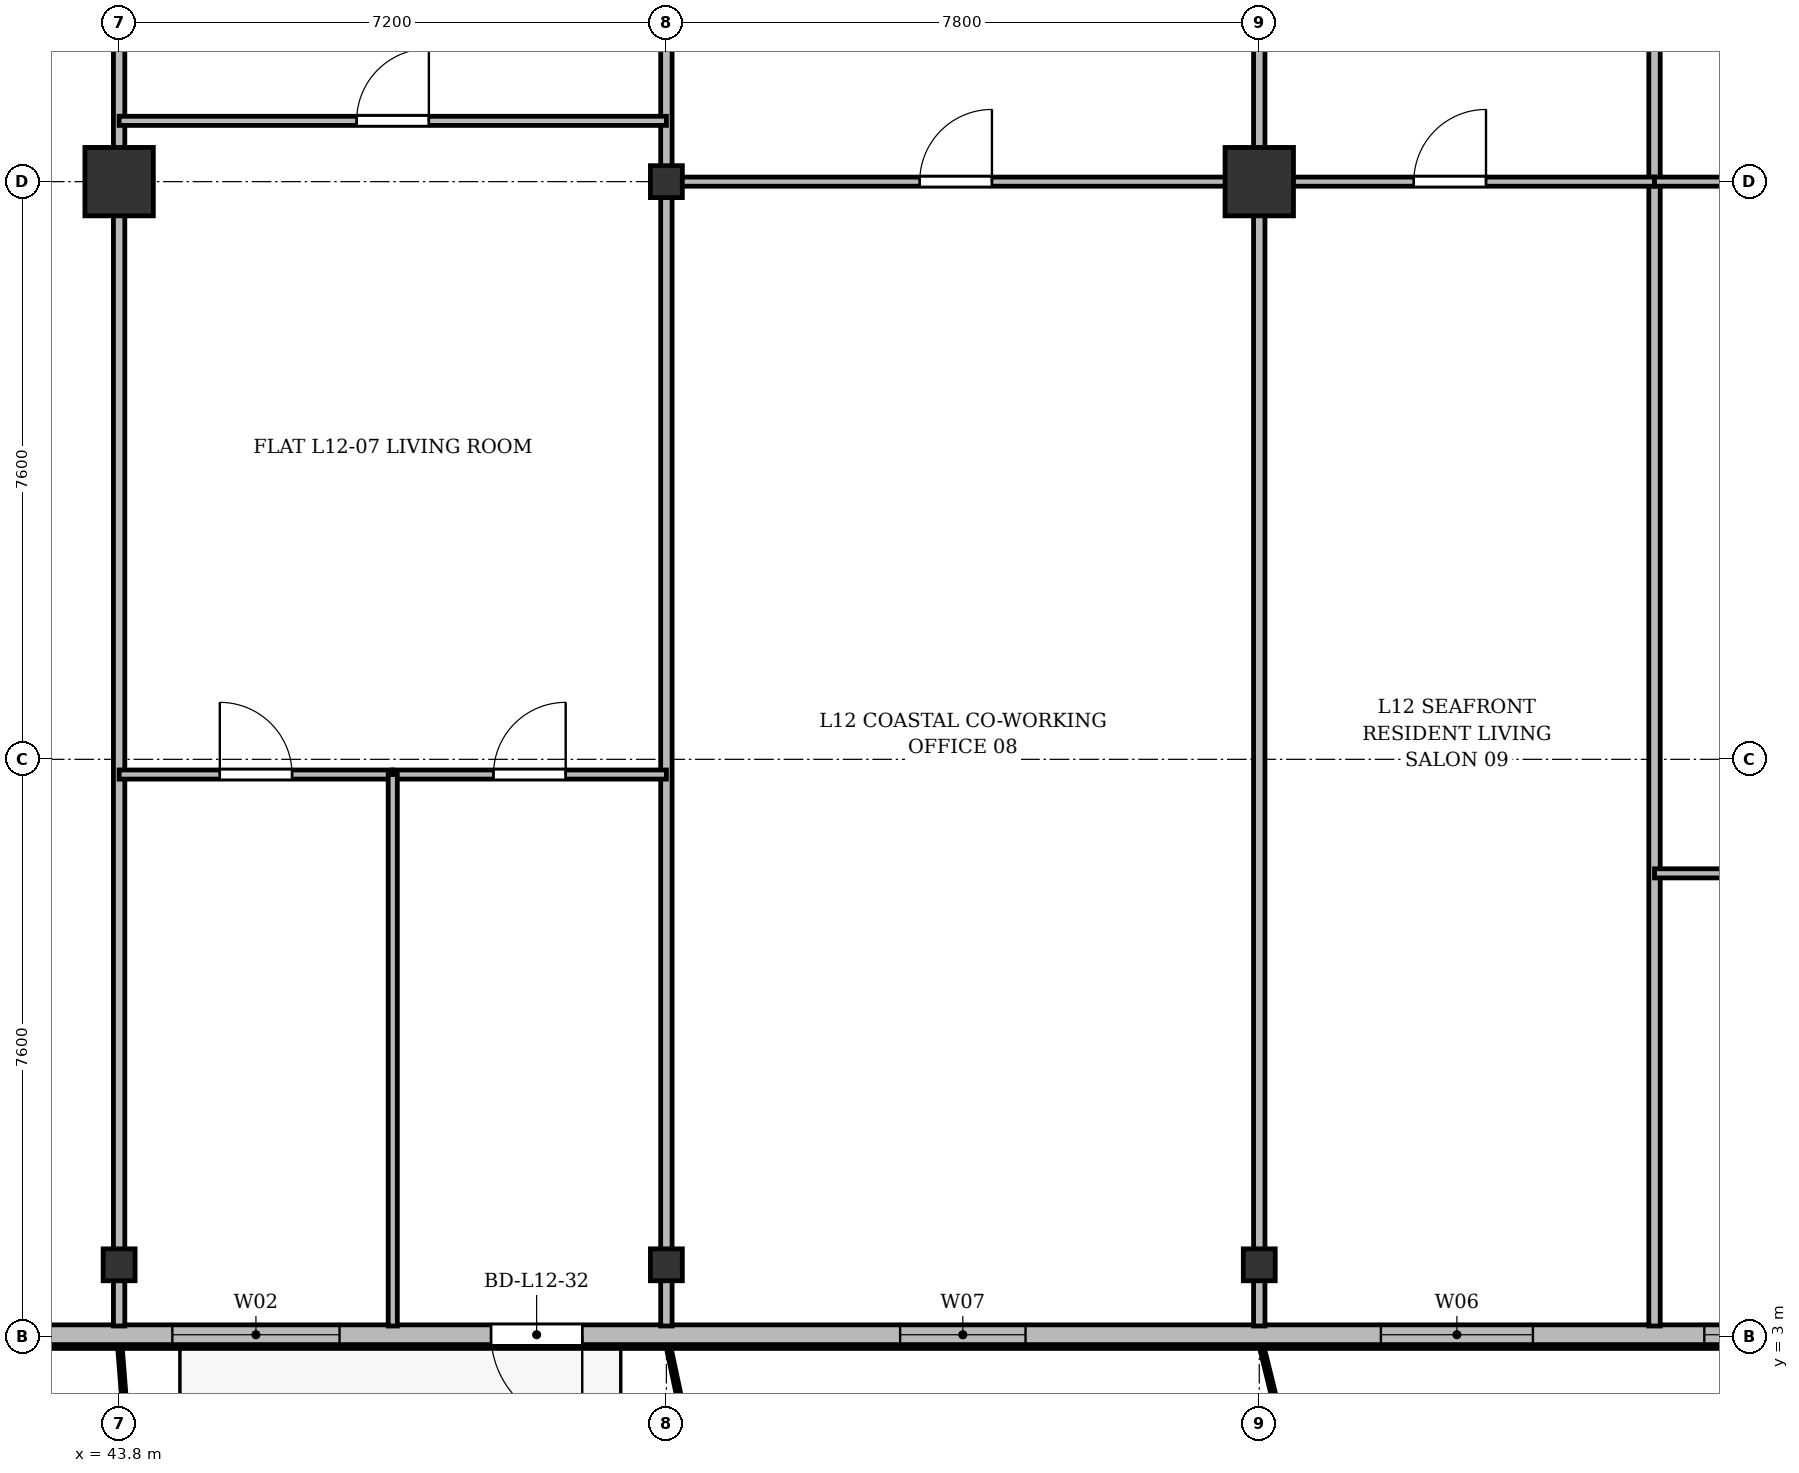
"""IFC4 building model, lengths in metres.
Left out: names, types, materials, properties, quantities, classifications, styles, units other than length and angle.
Written with IfcOpenShell. Run it as: python <this file> out.ifc"""

import sys

from ifc_helpers import new_model, si_unit, direction, frame, frame_2d, origin, origin_2d, place, context, subcontext, project, spatial, rectangle, i_section, extrude, source, transform, mapped, element, fill, save


model = new_model("IFC4")
c1 = context("Model", 3, precision=1e-05, world=origin(), true_north=direction((0.0, 1.0)))
c2 = subcontext(c1, "Body", "Model", "MODEL_VIEW")
j1 = project(units=[si_unit("LENGTHUNIT", "METRE"), si_unit("PLANEANGLEUNIT", "RADIAN")], contexts=[c1])
p1 = place(None, origin())
s1 = spatial("IfcSite", under=j1, at=p1, CompositionType="ELEMENT")
p2 = place(p1, origin())
s2 = spatial("IfcBuilding", under=s1, at=p2, CompositionType="ELEMENT")
p3 = place(p2, frame((0.0, 0.0, 48.7)))
s3 = spatial("IfcBuildingStorey", under=s2, at=p3, CompositionType="ELEMENT", Elevation=48.7)
m1 = source(origin(), c2, "Body", "SweptSolid", [
    extrude(i_section(OverallWidth=0.42, OverallDepth=0.42, WebThickness=0.026, FlangeThickness=0.04, at=origin_2d()), origin(), (0.0, 0.0, 1.0), 3.6),
])
p4 = place(p3, frame((43.8, 3.95, 0.0), z_axis=(0.0, 0.0, 1.0), x_axis=(1.0, 0.0, 0.0)))
e1 = element("IfcColumn", 1, at=p4, inside=s3, PredefinedType="COLUMN", context=c2, shape_type="MappedRepresentation", body=[
    mapped(m1, transform((0.0, 0.0, 0.0), x_axis=(1.0, 0.0, 0.0), y_axis=(0.0, 1.0, 0.0), z_axis=(0.0, 0.0, 1.0), scale=1.0)),
])
m2 = source(origin(), c2, "Body", "SweptSolid", [
    extrude(rectangle(XDim=0.9, YDim=0.9, at=origin_2d()), origin(), (0.0, 0.0, 1.0), 3.6),
])
p5 = place(p3, frame((43.8, 18.2, 0.0), z_axis=(0.0, 0.0, 1.0), x_axis=(1.0, 0.0, 0.0)))
e2 = element("IfcColumn", 2, at=p5, inside=s3, PredefinedType="COLUMN", context=c2, shape_type="MappedRepresentation", body=[
    mapped(m2, transform((0.0, 0.0, 0.0), x_axis=(1.0, 0.0, 0.0), y_axis=(0.0, 1.0, 0.0), z_axis=(0.0, 0.0, 1.0), scale=1.0)),
])
for number, where, z_axis, x_axis in (
    (3, (51.0, 3.95, 0.0), (0.0, 0.0, 1.0), (1.0, 0.0, 0.0)),
    (4, (51.0, 18.2, 0.0), (0.0, 0.0, 1.0), (1.0, 0.0, 0.0)),
    (5, (58.8, 3.95, 0.0), (0.0, 0.0, 1.0), (1.0, 0.0, 0.0)),
):
    element("IfcColumn", number, at=place(p3, frame(where, z_axis=z_axis, x_axis=x_axis)), inside=s3, PredefinedType="COLUMN", context=c2, shape_type="MappedRepresentation", body=[
        mapped(m1, transform((0.0, 0.0, 0.0), x_axis=(1.0, 0.0, 0.0), y_axis=(0.0, 1.0, 0.0), z_axis=(0.0, 0.0, 1.0), scale=1.0)),
    ])
p6 = place(p3, frame((58.8, 18.2, 0.0), z_axis=(0.0, 0.0, 1.0), x_axis=(1.0, 0.0, 0.0)))
e6 = element("IfcColumn", 6, at=p6, inside=s3, PredefinedType="COLUMN", context=c2, shape_type="MappedRepresentation", body=[
    mapped(m2, transform((0.0, 0.0, 0.0), x_axis=(1.0, 0.0, 0.0), y_axis=(0.0, 1.0, 0.0), z_axis=(0.0, 0.0, 1.0), scale=1.0)),
])
p7 = place(p3, frame((66.9, 3.03, 0.0), z_axis=(0.0, 0.0, 1.0), x_axis=(-1.0, 0.0, 0.0)))
e7 = element("IfcWall", 7, at=p7, inside=s3, PredefinedType="SOLIDWALL", context=c2, shape_type="SweptSolid", body=[
    extrude(rectangle(XDim=59.4, YDim=0.26, at=frame_2d((29.7, 0.0))), origin(), (0.0, 0.0, 1.0), 3.34),
])
p8 = place(p7, frame((0.745, 0.0, 0.9)))
e8 = element("IfcOpeningElement", 8, at=p8, cuts=e7, PredefinedType="OPENING", context=c2, shape_type="SweptSolid", body=[
    extrude(rectangle(XDim=1.5, YDim=1.75, at=frame_2d((0.75, 0.875))), frame((0.0, 0.14, 0.0), z_axis=(0.0, -1.0, 0.0), x_axis=(1.0, 0.0, 0.0)), (0.0, 0.0, 1.0), 0.28),
])
p9 = place(p7, frame((4.5, 0.0, 0.9)))
e9 = element("IfcOpeningElement", 9, at=p9, cuts=e7, PredefinedType="OPENING", context=c2, shape_type="SweptSolid", body=[
    extrude(rectangle(XDim=2.0, YDim=1.95, at=frame_2d((1.0, 0.975))), frame((0.0, 0.14, 0.0), z_axis=(0.0, -1.0, 0.0), x_axis=(1.0, 0.0, 0.0)), (0.0, 0.0, 1.0), 0.28),
])
p10 = place(p7, frame((11.175, 0.0, 0.9)))
e10 = element("IfcOpeningElement", 10, at=p10, cuts=e7, PredefinedType="OPENING", context=c2, shape_type="SweptSolid", body=[
    extrude(rectangle(XDim=1.65, YDim=1.85, at=frame_2d((0.825, 0.925))), frame((0.0, 0.14, 0.0), z_axis=(0.0, -1.0, 0.0), x_axis=(1.0, 0.0, 0.0)), (0.0, 0.0, 1.0), 0.28),
])
p11 = place(p7, frame((17.007, 0.0, 0.0)))
e11 = element("IfcOpeningElement", 11, at=p11, cuts=e7, PredefinedType="OPENING", context=c2, shape_type="SweptSolid", body=[
    extrude(rectangle(XDim=1.2, YDim=2.2, at=frame_2d((0.6, 1.1))), frame((0.0, 0.14, 0.0), z_axis=(0.0, -1.0, 0.0), x_axis=(1.0, 0.0, 0.0)), (0.0, 0.0, 1.0), 0.28),
])
p12 = place(p7, frame((20.2, 0.0, 0.9)))
e12 = element("IfcOpeningElement", 12, at=p12, cuts=e7, PredefinedType="OPENING", context=c2, shape_type="SweptSolid", body=[
    extrude(rectangle(XDim=2.2, YDim=1.8, at=frame_2d((1.1, 0.9))), frame((0.0, 0.14, 0.0), z_axis=(0.0, -1.0, 0.0), x_axis=(1.0, 0.0, 0.0)), (0.0, 0.0, 1.0), 0.28),
])
p13 = place(p7, frame((24.75, 0.0, 0.9)))
e13 = element("IfcOpeningElement", 13, at=p13, cuts=e7, PredefinedType="OPENING", context=c2, shape_type="SweptSolid", body=[
    extrude(rectangle(XDim=1.5, YDim=1.75, at=frame_2d((0.75, 0.875))), frame((0.0, 0.14, 0.0), z_axis=(0.0, -1.0, 0.0), x_axis=(1.0, 0.0, 0.0)), (0.0, 0.0, 1.0), 0.28),
])
p14 = place(p7, frame((31.1, 0.0, 0.9)))
e14 = element("IfcOpeningElement", 14, at=p14, cuts=e7, PredefinedType="OPENING", context=c2, shape_type="SweptSolid", body=[
    extrude(rectangle(XDim=2.0, YDim=1.95, at=frame_2d((1.0, 0.975))), frame((0.0, 0.14, 0.0), z_axis=(0.0, -1.0, 0.0), x_axis=(1.0, 0.0, 0.0)), (0.0, 0.0, 1.0), 0.28),
])
p15 = place(p7, frame((39.075, 0.0, 0.9)))
e15 = element("IfcOpeningElement", 15, at=p15, cuts=e7, PredefinedType="OPENING", context=c2, shape_type="SweptSolid", body=[
    extrude(rectangle(XDim=1.65, YDim=1.85, at=frame_2d((0.825, 0.925))), frame((0.0, 0.14, 0.0), z_axis=(0.0, -1.0, 0.0), x_axis=(1.0, 0.0, 0.0)), (0.0, 0.0, 1.0), 0.28),
])
p16 = place(p7, frame((45.435, 0.0, 0.0)))
e16 = element("IfcOpeningElement", 16, at=p16, cuts=e7, PredefinedType="OPENING", context=c2, shape_type="SweptSolid", body=[
    extrude(rectangle(XDim=1.2, YDim=2.2, at=frame_2d((0.6, 1.1))), frame((0.0, 0.14, 0.0), z_axis=(0.0, -1.0, 0.0), x_axis=(1.0, 0.0, 0.0)), (0.0, 0.0, 1.0), 0.28),
])
p17 = place(p7, frame((48.25, 0.0, 0.9)))
e17 = element("IfcOpeningElement", 17, at=p17, cuts=e7, PredefinedType="OPENING", context=c2, shape_type="SweptSolid", body=[
    extrude(rectangle(XDim=2.2, YDim=1.8, at=frame_2d((1.1, 0.9))), frame((0.0, 0.14, 0.0), z_axis=(0.0, -1.0, 0.0), x_axis=(1.0, 0.0, 0.0)), (0.0, 0.0, 1.0), 0.28),
])
p18 = place(p7, frame((52.35, 0.0, 0.9)))
e18 = element("IfcOpeningElement", 18, at=p18, cuts=e7, PredefinedType="OPENING", context=c2, shape_type="SweptSolid", body=[
    extrude(rectangle(XDim=1.5, YDim=1.75, at=frame_2d((0.75, 0.875))), frame((0.0, 0.14, 0.0), z_axis=(0.0, -1.0, 0.0), x_axis=(1.0, 0.0, 0.0)), (0.0, 0.0, 1.0), 0.28),
])
p19 = place(p7, frame((56.105, 0.0, 0.9)))
e19 = element("IfcOpeningElement", 19, at=p19, cuts=e7, PredefinedType="OPENING", context=c2, shape_type="SweptSolid", body=[
    extrude(rectangle(XDim=2.0, YDim=1.95, at=frame_2d((1.0, 0.975))), frame((0.0, 0.14, 0.0), z_axis=(0.0, -1.0, 0.0), x_axis=(1.0, 0.0, 0.0)), (0.0, 0.0, 1.0), 0.28),
])
for number, where, z_axis, x_axis in (
    (20, (43.8, 3.145, 0.0), (0.0, 0.0, 1.0), (0.0, 1.0, 0.0)),
    (21, (51.0, 3.145, 0.0), (0.0, 0.0, 1.0), (0.0, 1.0, 0.0)),
    (22, (58.8, 3.145, 0.0), (0.0, 0.0, 1.0), (0.0, 1.0, 0.0)),
):
    element("IfcWall", number, at=place(p3, frame(where, z_axis=z_axis, x_axis=x_axis)), inside=s3, PredefinedType="PARTITIONING", context=c2, shape_type="SweptSolid", body=[
        extrude(rectangle(XDim=24.455, YDim=0.15, at=frame_2d((12.228, 0.0))), origin(), (0.0, 0.0, 1.0), 2.752),
    ])
p20 = place(p3, frame((64.0, 3.145, 0.0), z_axis=(0.0, 0.0, 1.0), x_axis=(0.0, 1.0, 0.0)))
e23 = element("IfcWall", 23, at=p20, inside=s3, PredefinedType="PARTITIONING", context=c2, shape_type="SweptSolid", body=[
    extrude(rectangle(XDim=24.455, YDim=0.15, at=frame_2d((12.228, 0.0))), origin(), (0.0, 0.0, 1.0), 2.69),
])
p21 = place(p3, frame((43.8, 19.0, 0.0), z_axis=(0.0, 0.0, 1.0), x_axis=(1.0, 0.0, 0.0)))
e24 = element("IfcWall", 24, at=p21, inside=s3, PredefinedType="PARTITIONING", context=c2, shape_type="SweptSolid", body=[
    extrude(rectangle(XDim=7.2, YDim=0.12, at=frame_2d((3.6, 0.0))), origin(), (0.0, 0.0, 1.0), 2.752),
])
p22 = place(p21, frame((3.125, 0.0, 0.0)))
e25 = element("IfcOpeningElement", 25, at=p22, cuts=e24, PredefinedType="OPENING", context=c2, shape_type="SweptSolid", body=[
    extrude(rectangle(XDim=0.95, YDim=2.15, at=frame_2d((0.475, 1.075))), frame((0.0, 0.07, 0.0), z_axis=(0.0, -1.0, 0.0), x_axis=(1.0, 0.0, 0.0)), (0.0, 0.0, 1.0), 0.14),
])
p23 = place(p3, frame((43.8, 10.4, 0.0), z_axis=(0.0, 0.0, 1.0), x_axis=(1.0, 0.0, 0.0)))
e26 = element("IfcWall", 26, at=p23, inside=s3, PredefinedType="PARTITIONING", context=c2, shape_type="SweptSolid", body=[
    extrude(rectangle(XDim=3.6, YDim=0.12, at=frame_2d((1.8, 0.0))), origin(), (0.0, 0.0, 1.0), 2.752),
])
p24 = place(p23, frame((1.325, 0.0, 0.0)))
e27 = element("IfcOpeningElement", 27, at=p24, cuts=e26, PredefinedType="OPENING", context=c2, shape_type="SweptSolid", body=[
    extrude(rectangle(XDim=0.95, YDim=2.15, at=frame_2d((0.475, 1.075))), frame((0.0, 0.07, 0.0), z_axis=(0.0, -1.0, 0.0), x_axis=(1.0, 0.0, 0.0)), (0.0, 0.0, 1.0), 0.14),
])
p25 = place(p3, frame((47.4, 10.4, 0.0), z_axis=(0.0, 0.0, 1.0), x_axis=(1.0, 0.0, 0.0)))
e28 = element("IfcWall", 28, at=p25, inside=s3, PredefinedType="PARTITIONING", context=c2, shape_type="SweptSolid", body=[
    extrude(rectangle(XDim=3.6, YDim=0.12, at=frame_2d((1.8, 0.0))), origin(), (0.0, 0.0, 1.0), 2.752),
])
p26 = place(p25, frame((1.325, 0.0, 0.0)))
e29 = element("IfcOpeningElement", 29, at=p26, cuts=e28, PredefinedType="OPENING", context=c2, shape_type="SweptSolid", body=[
    extrude(rectangle(XDim=0.95, YDim=2.15, at=frame_2d((0.475, 1.075))), frame((0.0, 0.07, 0.0), z_axis=(0.0, -1.0, 0.0), x_axis=(1.0, 0.0, 0.0)), (0.0, 0.0, 1.0), 0.14),
])
p27 = place(p3, frame((47.4, 3.145, 0.0), z_axis=(0.0, 0.0, 1.0), x_axis=(0.0, 1.0, 0.0)))
e30 = element("IfcWall", 30, at=p27, inside=s3, PredefinedType="PARTITIONING", context=c2, shape_type="SweptSolid", body=[
    extrude(rectangle(XDim=7.255, YDim=0.12, at=frame_2d((3.627, 0.0))), origin(), (0.0, 0.0, 1.0), 2.69),
])
p28 = place(p3, frame((51.0, 18.2, 0.0), z_axis=(0.0, 0.0, 1.0), x_axis=(1.0, 0.0, 0.0)))
e31 = element("IfcWall", 31, at=p28, inside=s3, PredefinedType="PARTITIONING", context=c2, shape_type="SweptSolid", body=[
    extrude(rectangle(XDim=7.8, YDim=0.12, at=frame_2d((3.9, 0.0))), origin(), (0.0, 0.0, 1.0), 2.69),
])
p29 = place(p28, frame((3.333, 0.0, 0.0)))
e32 = element("IfcOpeningElement", 32, at=p29, cuts=e31, PredefinedType="OPENING", context=c2, shape_type="SweptSolid", body=[
    extrude(rectangle(XDim=0.95, YDim=2.15, at=frame_2d((0.475, 1.075))), frame((0.0, 0.07, 0.0), z_axis=(0.0, -1.0, 0.0), x_axis=(1.0, 0.0, 0.0)), (0.0, 0.0, 1.0), 0.14),
])
p30 = place(p3, frame((58.8, 18.2, 0.0), z_axis=(0.0, 0.0, 1.0), x_axis=(1.0, 0.0, 0.0)))
e33 = element("IfcWall", 33, at=p30, inside=s3, PredefinedType="PARTITIONING", context=c2, shape_type="SweptSolid", body=[
    extrude(rectangle(XDim=5.2, YDim=0.12, at=frame_2d((2.6, 0.0))), origin(), (0.0, 0.0, 1.0), 2.69),
])
p31 = place(p30, frame((2.033, 0.0, 0.0)))
e34 = element("IfcOpeningElement", 34, at=p31, cuts=e33, PredefinedType="OPENING", context=c2, shape_type="SweptSolid", body=[
    extrude(rectangle(XDim=0.95, YDim=2.15, at=frame_2d((0.475, 1.075))), frame((0.0, 0.07, 0.0), z_axis=(0.0, -1.0, 0.0), x_axis=(1.0, 0.0, 0.0)), (0.0, 0.0, 1.0), 0.14),
])
p32 = place(p3, frame((64.0, 18.2, 0.0), z_axis=(0.0, 0.0, 1.0), x_axis=(1.0, 0.0, 0.0)))
e35 = element("IfcWall", 35, at=p32, inside=s3, PredefinedType="PARTITIONING", context=c2, shape_type="SweptSolid", body=[
    extrude(rectangle(XDim=5.64, YDim=0.12, at=frame_2d((2.82, 0.0))), origin(), (0.0, 0.0, 1.0), 2.69),
])
p33 = place(p32, frame((2.626, 0.0, 0.0)))
e36 = element("IfcOpeningElement", 36, at=p33, cuts=e35, PredefinedType="OPENING", context=c2, shape_type="SweptSolid", body=[
    extrude(rectangle(XDim=0.95, YDim=2.15, at=frame_2d((0.475, 1.075))), frame((0.0, 0.07, 0.0), z_axis=(0.0, -1.0, 0.0), x_axis=(1.0, 0.0, 0.0)), (0.0, 0.0, 1.0), 0.14),
])
p34 = place(p3, frame((64.0, 9.1, 0.0), z_axis=(0.0, 0.0, 1.0), x_axis=(1.0, 0.0, 0.0)))
e37 = element("IfcWall", 37, at=p34, inside=s3, PredefinedType="PARTITIONING", context=c2, shape_type="SweptSolid", body=[
    extrude(rectangle(XDim=5.64, YDim=0.12, at=frame_2d((2.82, 0.0))), origin(), (0.0, 0.0, 1.0), 2.752),
])
p35 = place(p34, frame((2.251, 0.0, 0.0)))
e38 = element("IfcOpeningElement", 38, at=p35, cuts=e37, PredefinedType="OPENING", context=c2, shape_type="SweptSolid", body=[
    extrude(rectangle(XDim=0.95, YDim=2.15, at=frame_2d((0.475, 1.075))), frame((0.0, 0.07, 0.0), z_axis=(0.0, -1.0, 0.0), x_axis=(1.0, 0.0, 0.0)), (0.0, 0.0, 1.0), 0.14),
])
m3 = source(origin(), c2, "Body", "SweptSolid", [
    extrude(rectangle(XDim=1.5, YDim=1.75, at=frame_2d((0.75, 0.875))), frame((0.0, 0.03, 0.0), z_axis=(0.0, -1.0, 0.0), x_axis=(1.0, 0.0, 0.0)), (0.0, 0.0, 1.0), 0.06),
])
p36 = place(p8, origin())
e39 = element("IfcWindow", 39, at=p36, inside=s3, PartitioningType="SINGLE_PANEL", PredefinedType="WINDOW", context=c2, shape_type="MappedRepresentation", body=[
    mapped(m3, transform((0.0, 0.0, 0.0), x_axis=(1.0, 0.0, 0.0), y_axis=(0.0, 1.0, 0.0), z_axis=(0.0, 0.0, 1.0), scale=1.0)),
])
fill(e8, e39)
m4 = source(origin(), c2, "Body", "SweptSolid", [
    extrude(rectangle(XDim=2.0, YDim=1.95, at=frame_2d((1.0, 0.975))), frame((0.0, 0.03, 0.0), z_axis=(0.0, -1.0, 0.0), x_axis=(1.0, 0.0, 0.0)), (0.0, 0.0, 1.0), 0.06),
])
p37 = place(p9, origin())
e40 = element("IfcWindow", 40, at=p37, inside=s3, PartitioningType="SINGLE_PANEL", PredefinedType="WINDOW", context=c2, shape_type="MappedRepresentation", body=[
    mapped(m4, transform((0.0, 0.0, 0.0), x_axis=(1.0, 0.0, 0.0), y_axis=(0.0, 1.0, 0.0), z_axis=(0.0, 0.0, 1.0), scale=1.0)),
])
fill(e9, e40)
m5 = source(origin(), c2, "Body", "SweptSolid", [
    extrude(rectangle(XDim=1.65, YDim=1.85, at=frame_2d((0.825, 0.925))), frame((0.0, 0.03, 0.0), z_axis=(0.0, -1.0, 0.0), x_axis=(1.0, 0.0, 0.0)), (0.0, 0.0, 1.0), 0.06),
])
p38 = place(p10, origin())
e41 = element("IfcWindow", 41, at=p38, inside=s3, PartitioningType="SINGLE_PANEL", PredefinedType="WINDOW", context=c2, shape_type="MappedRepresentation", body=[
    mapped(m5, transform((0.0, 0.0, 0.0), x_axis=(1.0, 0.0, 0.0), y_axis=(0.0, 1.0, 0.0), z_axis=(0.0, 0.0, 1.0), scale=1.0)),
])
fill(e10, e41)
m6 = source(origin(), c2, "Body", "SweptSolid", [
    extrude(rectangle(XDim=1.2, YDim=2.2, at=frame_2d((0.6, 1.1))), frame((0.0, 0.025, 0.0), z_axis=(0.0, -1.0, 0.0), x_axis=(1.0, 0.0, 0.0)), (0.0, 0.0, 1.0), 0.05),
])
p39 = place(p11, origin())
e42 = element("IfcDoor", 42, at=p39, inside=s3, OperationType="SINGLE_SWING_LEFT", PredefinedType="DOOR", context=c2, shape_type="MappedRepresentation", body=[
    mapped(m6, transform((0.0, 0.0, 0.0), x_axis=(1.0, 0.0, 0.0), y_axis=(0.0, 1.0, 0.0), z_axis=(0.0, 0.0, 1.0), scale=1.0)),
])
fill(e11, e42)
m7 = source(origin(), c2, "Body", "SweptSolid", [
    extrude(rectangle(XDim=2.2, YDim=1.8, at=frame_2d((1.1, 0.9))), frame((0.0, 0.03, 0.0), z_axis=(0.0, -1.0, 0.0), x_axis=(1.0, 0.0, 0.0)), (0.0, 0.0, 1.0), 0.06),
])
p40 = place(p12, origin())
e43 = element("IfcWindow", 43, at=p40, inside=s3, PartitioningType="SINGLE_PANEL", PredefinedType="WINDOW", context=c2, shape_type="MappedRepresentation", body=[
    mapped(m7, transform((0.0, 0.0, 0.0), x_axis=(1.0, 0.0, 0.0), y_axis=(0.0, 1.0, 0.0), z_axis=(0.0, 0.0, 1.0), scale=1.0)),
])
fill(e12, e43)
m8 = source(origin(), c2, "Body", "SweptSolid", [
    extrude(rectangle(XDim=0.95, YDim=2.15, at=frame_2d((0.475, 1.075))), frame((0.0, 0.025, 0.0), z_axis=(0.0, -1.0, 0.0), x_axis=(1.0, 0.0, 0.0)), (0.0, 0.0, 1.0), 0.05),
])
p41 = place(p22, origin())
e44 = element("IfcDoor", 44, at=p41, inside=s3, OperationType="SINGLE_SWING_RIGHT", PredefinedType="DOOR", context=c2, shape_type="MappedRepresentation", body=[
    mapped(m8, transform((0.0, 0.0, 0.0), x_axis=(1.0, 0.0, 0.0), y_axis=(0.0, 1.0, 0.0), z_axis=(0.0, 0.0, 1.0), scale=1.0)),
])
fill(e25, e44)
p42 = place(p24, origin())
e45 = element("IfcDoor", 45, at=p42, inside=s3, OperationType="SINGLE_SWING_LEFT", PredefinedType="DOOR", context=c2, shape_type="MappedRepresentation", body=[
    mapped(m8, transform((0.0, 0.0, 0.0), x_axis=(1.0, 0.0, 0.0), y_axis=(0.0, 1.0, 0.0), z_axis=(0.0, 0.0, 1.0), scale=1.0)),
])
fill(e27, e45)
p43 = place(p26, origin())
e46 = element("IfcDoor", 46, at=p43, inside=s3, OperationType="SINGLE_SWING_RIGHT", PredefinedType="DOOR", context=c2, shape_type="MappedRepresentation", body=[
    mapped(m8, transform((0.0, 0.0, 0.0), x_axis=(1.0, 0.0, 0.0), y_axis=(0.0, 1.0, 0.0), z_axis=(0.0, 0.0, 1.0), scale=1.0)),
])
fill(e29, e46)
p44 = place(p29, origin())
e47 = element("IfcDoor", 47, at=p44, inside=s3, OperationType="SINGLE_SWING_RIGHT", PredefinedType="DOOR", context=c2, shape_type="MappedRepresentation", body=[
    mapped(m8, transform((0.0, 0.0, 0.0), x_axis=(1.0, 0.0, 0.0), y_axis=(0.0, 1.0, 0.0), z_axis=(0.0, 0.0, 1.0), scale=1.0)),
])
fill(e32, e47)
p45 = place(p31, origin())
e48 = element("IfcDoor", 48, at=p45, inside=s3, OperationType="SINGLE_SWING_RIGHT", PredefinedType="DOOR", context=c2, shape_type="MappedRepresentation", body=[
    mapped(m8, transform((0.0, 0.0, 0.0), x_axis=(1.0, 0.0, 0.0), y_axis=(0.0, 1.0, 0.0), z_axis=(0.0, 0.0, 1.0), scale=1.0)),
])
fill(e34, e48)
save(model, sys.argv[1])
